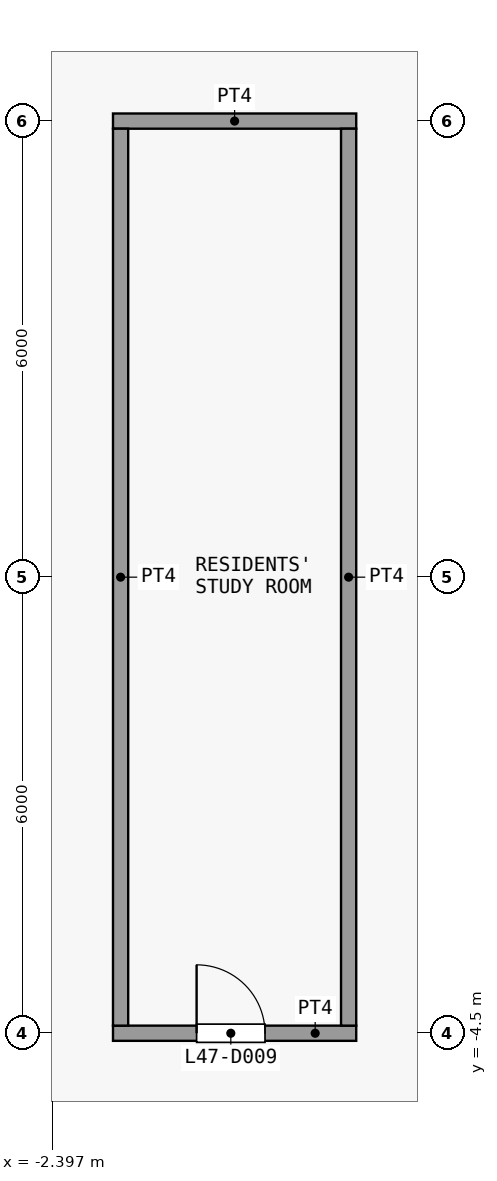
"""IFC4 building model, lengths in metres.
Left out: names, types, materials, properties, quantities, classifications, styles, units other than length and angle.
Written with IfcOpenShell. Run it as: python <this file> out.ifc"""

import sys

from ifc_helpers import new_model, si_unit, direction, frame, frame_2d, origin, place, context, subcontext, project, spatial, rectangle, extrude, element, fill, save


model = new_model("IFC4")
c1 = context("Model", 3, precision=1e-05, world=origin(), true_north=direction((0.0, 1.0)))
c2 = subcontext(c1, "Body", "Model", "MODEL_VIEW")
j1 = project(units=[si_unit("LENGTHUNIT", "METRE"), si_unit("PLANEANGLEUNIT", "RADIAN")], contexts=[c1])
p1 = place(None, origin())
s1 = spatial("IfcSite", under=j1, at=p1, CompositionType="ELEMENT")
p2 = place(p1, origin())
s2 = spatial("IfcBuilding", under=s1, at=p2, CompositionType="ELEMENT")
p3 = place(p2, frame((0.0, 0.0, 188.9)))
s3 = spatial("IfcBuildingStorey", under=s2, at=p3, CompositionType="ELEMENT", Elevation=188.9)
p4 = place(p3, frame((-1.6, -4.5, 0.0), z_axis=(0.0, 0.0, 1.0), x_axis=(1.0, 0.0, 0.0)))
e1 = element("IfcWall", 1, at=p4, inside=s3, PredefinedType="PARTITIONING", context=c2, shape_type="SweptSolid", body=[
    extrude(rectangle(XDim=3.2, YDim=0.2, at=frame_2d((1.6, 0.0))), origin(), (0.0, 0.0, 1.0), 3.3),
])
p5 = place(p4, frame((1.1, 0.0, 0.0)))
e2 = element("IfcOpeningElement", 2, at=p5, cuts=e1, PredefinedType="OPENING", context=c2, shape_type="SweptSolid", body=[
    extrude(rectangle(XDim=0.9, YDim=2.1, at=frame_2d((0.45, 1.05))), frame((0.0, 0.11, 0.0), z_axis=(0.0, -1.0, 0.0), x_axis=(1.0, 0.0, 0.0)), (0.0, 0.0, 1.0), 0.22),
])
p6 = place(p3, frame((-1.6, 7.5, 0.0), z_axis=(0.0, 0.0, 1.0), x_axis=(1.0, 0.0, 0.0)))
e3 = element("IfcWall", 3, at=p6, inside=s3, PredefinedType="PARTITIONING", context=c2, shape_type="SweptSolid", body=[
    extrude(rectangle(XDim=3.2, YDim=0.2, at=frame_2d((1.6, 0.0))), origin(), (0.0, 0.0, 1.0), 3.3),
])
for number, where, z_axis, x_axis in (
    (4, (-1.5, -4.4, 0.0), (0.0, 0.0, 1.0), (0.0, 1.0, 0.0)),
    (5, (1.5, -4.4, 0.0), (0.0, 0.0, 1.0), (0.0, 1.0, 0.0)),
):
    element("IfcWall", number, at=place(p3, frame(where, z_axis=z_axis, x_axis=x_axis)), inside=s3, PredefinedType="PARTITIONING", context=c2, shape_type="SweptSolid", body=[
        extrude(rectangle(XDim=11.8, YDim=0.2, at=frame_2d((5.9, 0.0))), origin(), (0.0, 0.0, 1.0), 3.3),
    ])
p7 = place(p5, origin())
e6 = element("IfcDoor", 6, at=p7, inside=s3, OperationType="SINGLE_SWING_RIGHT", PredefinedType="DOOR", context=c2, shape_type="SweptSolid", body=[
    extrude(rectangle(XDim=0.9, YDim=2.1, at=frame_2d((0.45, 1.05))), frame((0.0, 0.025, 0.0), z_axis=(0.0, -1.0, 0.0), x_axis=(1.0, 0.0, 0.0)), (0.0, 0.0, 1.0), 0.05),
])
fill(e2, e6)
save(model, sys.argv[1])
